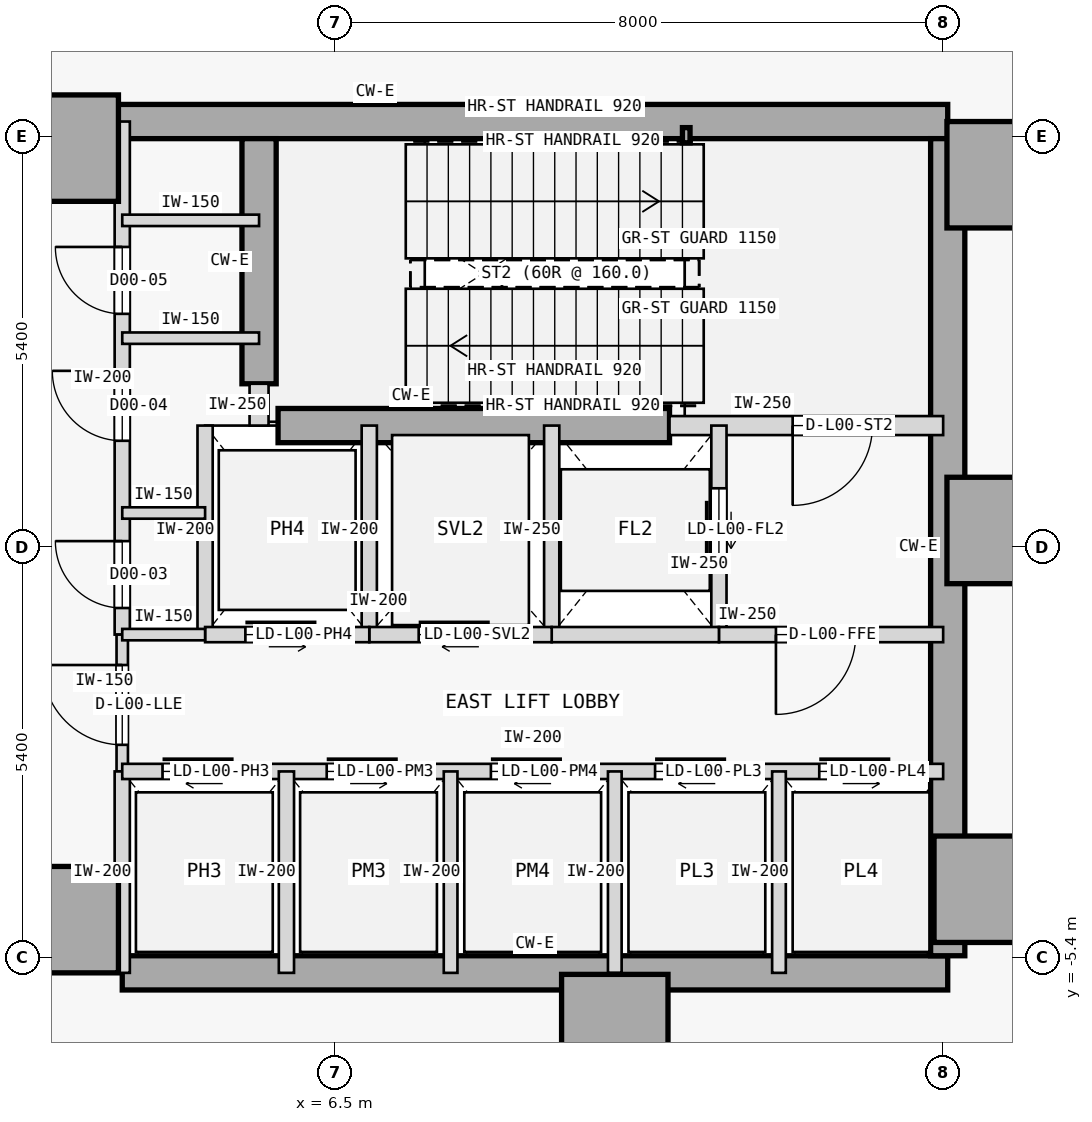
"""IFC4 building model, lengths in metres.
Left out: names, types, materials, properties, quantities, classifications, styles, units other than length and angle.
Written with IfcOpenShell. Run it as: python <this file> out.ifc"""

import sys

from ifc_helpers import new_model, si_unit, direction, frame, frame_2d, origin, origin_2d, place, context, subcontext, project, spatial, rectangle, hollow_rectangle, extrude, element, fill, save


model = new_model("IFC4")
c1 = context("Model", 3, precision=1e-05, world=origin(), true_north=direction((0.0, 1.0)))
c2 = subcontext(c1, "Body", "Model", "MODEL_VIEW")
j1 = project(units=[si_unit("LENGTHUNIT", "METRE"), si_unit("PLANEANGLEUNIT", "RADIAN")], contexts=[c1])
p1 = place(None, origin())
s1 = spatial("IfcSite", under=j1, at=p1, CompositionType="ELEMENT")
p2 = place(p1, origin())
s2 = spatial("IfcBuilding", under=s1, at=p2, CompositionType="ELEMENT")
p3 = place(p2, origin())
s3 = spatial("IfcBuildingStorey", under=s2, at=p3, CompositionType="ELEMENT", Elevation=0.0)
for number, where, z_axis, x_axis in (
    (1, (15.25, 4.9, 0.0), (0.0, 0.0, 1.0), (1.0, 0.0, 0.0)),
    (2, (15.25, 0.22, 0.0), (0.0, 0.0, 1.0), (1.0, 0.0, 0.0)),
    (3, (15.08, -4.5, 0.0), (0.0, 0.0, 1.0), (1.0, 0.0, 0.0)),
    (4, (10.18, -6.32, 0.0), (0.0, 0.0, 1.0), (1.0, 0.0, 0.0)),
    (5, (2.95, -4.9, 0.0), (0.0, 0.0, 1.0), (1.0, 0.0, 0.0)),
    (6, (2.95, 5.25, 0.0), (0.0, 0.0, 1.0), (1.0, 0.0, 0.0)),
):
    element("IfcColumn", number, at=place(p3, frame(where, z_axis=z_axis, x_axis=x_axis)), inside=s3, PredefinedType="COLUMN", context=c2, shape_type="SweptSolid", body=[
        extrude(rectangle(XDim=1.4, YDim=1.4, at=origin_2d()), origin(), (0.0, 0.0, 1.0), 9.6),
    ])
p4 = place(p3, frame((3.15, 5.6, 0.0), z_axis=(0.0, 0.0, 1.0), x_axis=(1.0, 0.0, 0.0)))
e7 = element("IfcWall", 7, at=p4, inside=s3, PredefinedType="SHEAR", context=c2, shape_type="SweptSolid", body=[
    extrude(rectangle(XDim=11.41, YDim=0.45, at=frame_2d((5.705, 0.0))), origin(), (0.0, 0.0, 1.0), 9.2),
])
p5 = place(p3, frame((3.7, -5.6, 0.0), z_axis=(0.0, 0.0, 1.0), x_axis=(1.0, 0.0, 0.0)))
e8 = element("IfcWall", 8, at=p5, inside=s3, PredefinedType="SHEAR", context=c2, shape_type="SweptSolid", body=[
    extrude(rectangle(XDim=10.86, YDim=0.45, at=frame_2d((5.43, 0.0))), origin(), (0.0, 0.0, 1.0), 9.2),
])
p6 = place(p3, frame((14.56, -5.375, 0.0), z_axis=(0.0, 0.0, 1.0), x_axis=(0.0, 1.0, 0.0)))
e9 = element("IfcWall", 9, at=p6, inside=s3, PredefinedType="SHEAR", context=c2, shape_type="SweptSolid", body=[
    extrude(rectangle(XDim=10.75, YDim=0.45, at=frame_2d((5.375, 0.0))), origin(), (0.0, 0.0, 1.0), 9.2),
])
p7 = place(p3, frame((5.5, 2.15, 0.0), z_axis=(0.0, 0.0, 1.0), x_axis=(0.0, 1.0, 0.0)))
e10 = element("IfcWall", 10, at=p7, inside=s3, PredefinedType="SHEAR", context=c2, shape_type="SweptSolid", body=[
    extrude(rectangle(XDim=3.225, YDim=0.45, at=frame_2d((1.613, 0.0))), origin(), (0.0, 0.0, 1.0), 9.2),
])
p8 = place(p3, frame((5.75, 1.6, 0.0), z_axis=(0.0, 0.0, 1.0), x_axis=(1.0, 0.0, 0.0)))
e11 = element("IfcWall", 11, at=p8, inside=s3, PredefinedType="SHEAR", context=c2, shape_type="SweptSolid", body=[
    extrude(rectangle(XDim=5.15, YDim=0.45, at=frame_2d((2.575, 0.0))), origin(), (0.0, 0.0, 1.0), 9.2),
])
p9 = place(p3, frame((11.12, 5.42, 0.0), z_axis=(0.0, 0.0, 1.0), x_axis=(1.0, 0.0, 0.0)))
e12 = element("IfcColumn", 12, at=p9, inside=s3, PredefinedType="COLUMN", context=c2, shape_type="SweptSolid", body=[
    extrude(hollow_rectangle(XDim=0.1, YDim=0.2, WallThickness=0.008, at=origin_2d()), origin(), (0.0, 0.0, 1.0), 9.6),
])
p10 = place(p3, frame((10.9, 1.6, 0.0), z_axis=(0.0, 0.0, 1.0), x_axis=(1.0, 0.0, 0.0)))
e13 = element("IfcWall", 13, at=p10, inside=s3, PredefinedType="STANDARD", context=c2, shape_type="SweptSolid", body=[
    extrude(rectangle(XDim=3.6, YDim=0.25, at=frame_2d((1.8, 0.0))), origin(), (0.0, 0.0, 1.0), 9.2),
])
p11 = place(p10, frame((1.62, 0.0, 0.0)))
e14 = element("IfcOpeningElement", 14, at=p11, cuts=e13, PredefinedType="OPENING", context=c2, shape_type="SweptSolid", body=[
    extrude(rectangle(XDim=1.05, YDim=2.15, at=frame_2d((0.525, 1.075))), frame((0.0, 0.135, 0.0), z_axis=(0.0, -1.0, 0.0), x_axis=(1.0, 0.0, 0.0)), (0.0, 0.0, 1.0), 0.27),
])
p12 = place(p3, frame((5.5, 1.6, 0.0), z_axis=(0.0, 0.0, 1.0), x_axis=(0.0, 1.0, 0.0)))
e15 = element("IfcWall", 15, at=p12, inside=s3, PredefinedType="STANDARD", context=c2, shape_type="SweptSolid", body=[
    extrude(rectangle(XDim=0.55, YDim=0.25, at=frame_2d((0.275, 0.0))), origin(), (0.0, 0.0, 1.0), 9.2),
])
p13 = place(p3, frame((3.7, -1.15, 0.0), z_axis=(0.0, 0.0, 1.0), x_axis=(0.0, 1.0, 0.0)))
e16 = element("IfcWall", 16, at=p13, inside=s3, PredefinedType="STANDARD", context=c2, shape_type="SweptSolid", body=[
    extrude(rectangle(XDim=6.75, YDim=0.2, at=frame_2d((3.375, 0.0))), origin(), (0.0, 0.0, 1.0), 9.2),
])
p14 = place(p13, frame((0.35, 0.0, 0.0)))
e17 = element("IfcOpeningElement", 17, at=p14, cuts=e16, PredefinedType="OPENING", context=c2, shape_type="SweptSolid", body=[
    extrude(rectangle(XDim=0.88, YDim=2.15, at=frame_2d((0.44, 1.075))), frame((0.0, 0.11, 0.0), z_axis=(0.0, -1.0, 0.0), x_axis=(1.0, 0.0, 0.0)), (0.0, 0.0, 1.0), 0.22),
])
p15 = place(p13, frame((2.55, 0.0, 0.0)))
e18 = element("IfcOpeningElement", 18, at=p15, cuts=e16, PredefinedType="OPENING", context=c2, shape_type="SweptSolid", body=[
    extrude(rectangle(XDim=0.92, YDim=2.15, at=frame_2d((0.46, 1.075))), frame((0.0, 0.11, 0.0), z_axis=(0.0, -1.0, 0.0), x_axis=(1.0, 0.0, 0.0)), (0.0, 0.0, 1.0), 0.22),
])
p16 = place(p13, frame((4.22, 0.0, 0.0)))
e19 = element("IfcOpeningElement", 19, at=p16, cuts=e16, PredefinedType="OPENING", context=c2, shape_type="SweptSolid", body=[
    extrude(rectangle(XDim=0.88, YDim=2.15, at=frame_2d((0.44, 1.075))), frame((0.0, 0.11, 0.0), z_axis=(0.0, -1.0, 0.0), x_axis=(1.0, 0.0, 0.0)), (0.0, 0.0, 1.0), 0.22),
])
p17 = place(p3, frame((3.7, -2.95, 0.0), z_axis=(0.0, 0.0, 1.0), x_axis=(0.0, 1.0, 0.0)))
e20 = element("IfcWall", 20, at=p17, inside=s3, PredefinedType="PARTITIONING", context=c2, shape_type="SweptSolid", body=[
    extrude(rectangle(XDim=1.8, YDim=0.15, at=frame_2d((0.9, 0.0))), origin(), (0.0, 0.0, 1.0), 9.2),
])
p18 = place(p17, frame((0.35, 0.0, 0.0)))
e21 = element("IfcOpeningElement", 21, at=p18, cuts=e20, PredefinedType="OPENING", context=c2, shape_type="SweptSolid", body=[
    extrude(rectangle(XDim=1.05, YDim=2.18, at=frame_2d((0.525, 1.09))), frame((0.0, 0.085, 0.0), z_axis=(0.0, -1.0, 0.0), x_axis=(1.0, 0.0, 0.0)), (0.0, 0.0, 1.0), 0.17),
])
p19 = place(p3, frame((3.7, -5.6, 0.0), z_axis=(0.0, 0.0, 1.0), x_axis=(0.0, 1.0, 0.0)))
e22 = element("IfcWall", 22, at=p19, inside=s3, PredefinedType="STANDARD", context=c2, shape_type="SweptSolid", body=[
    extrude(rectangle(XDim=2.65, YDim=0.2, at=frame_2d((1.325, 0.0))), origin(), (0.0, 0.0, 1.0), 9.2),
])
p20 = place(p3, frame((11.55, -1.15, 0.0), z_axis=(0.0, 0.0, 1.0), x_axis=(0.0, 1.0, 0.0)))
e23 = element("IfcWall", 23, at=p20, inside=s3, PredefinedType="STANDARD", context=c2, shape_type="SweptSolid", body=[
    extrude(rectangle(XDim=2.75, YDim=0.2, at=frame_2d((1.375, 0.0))), origin(), (0.0, 0.0, 1.0), 9.2),
])
p21 = place(p20, frame((0.825, 0.0, 0.0)))
e24 = element("IfcOpeningElement", 24, at=p21, cuts=e23, PredefinedType="OPENING", context=c2, shape_type="SweptSolid", body=[
    extrude(rectangle(XDim=1.1, YDim=2.15, at=frame_2d((0.55, 1.075))), frame((0.0, 0.11, 0.0), z_axis=(0.0, -1.0, 0.0), x_axis=(1.0, 0.0, 0.0)), (0.0, 0.0, 1.0), 0.22),
])
p22 = place(p3, frame((9.35, -1.15, 0.0), z_axis=(0.0, 0.0, 1.0), x_axis=(0.0, 1.0, 0.0)))
e25 = element("IfcWall", 25, at=p22, inside=s3, PredefinedType="STANDARD", context=c2, shape_type="SweptSolid", body=[
    extrude(rectangle(XDim=2.75, YDim=0.2, at=frame_2d((1.375, 0.0))), origin(), (0.0, 0.0, 1.0), 9.2),
])
p23 = place(p3, frame((11.55, -1.15, 0.0), z_axis=(0.0, 0.0, 1.0), x_axis=(1.0, 0.0, 0.0)))
e26 = element("IfcWall", 26, at=p23, inside=s3, PredefinedType="STANDARD", context=c2, shape_type="SweptSolid", body=[
    extrude(rectangle(XDim=2.95, YDim=0.2, at=frame_2d((1.475, 0.0))), origin(), (0.0, 0.0, 1.0), 9.2),
])
p24 = place(p23, frame((0.75, 0.0, 0.0)))
e27 = element("IfcOpeningElement", 27, at=p24, cuts=e26, PredefinedType="OPENING", context=c2, shape_type="SweptSolid", body=[
    extrude(rectangle(XDim=1.05, YDim=2.18, at=frame_2d((0.525, 1.09))), frame((0.0, 0.11, 0.0), z_axis=(0.0, -1.0, 0.0), x_axis=(1.0, 0.0, 0.0)), (0.0, 0.0, 1.0), 0.22),
])
p25 = place(p3, frame((9.35, -1.15, 0.0), z_axis=(0.0, 0.0, 1.0), x_axis=(1.0, 0.0, 0.0)))
e28 = element("IfcWall", 28, at=p25, inside=s3, PredefinedType="STANDARD", context=c2, shape_type="SweptSolid", body=[
    extrude(rectangle(XDim=2.2, YDim=0.2, at=frame_2d((1.1, 0.0))), origin(), (0.0, 0.0, 1.0), 9.2),
])
p26 = place(p3, frame((6.95, -1.15, 0.0), z_axis=(0.0, 0.0, 1.0), x_axis=(0.0, 1.0, 0.0)))
e29 = element("IfcWall", 29, at=p26, inside=s3, PredefinedType="STANDARD", context=c2, shape_type="SweptSolid", body=[
    extrude(rectangle(XDim=2.75, YDim=0.2, at=frame_2d((1.375, 0.0))), origin(), (0.0, 0.0, 1.0), 9.2),
])
p27 = place(p3, frame((6.95, -1.15, 0.0), z_axis=(0.0, 0.0, 1.0), x_axis=(1.0, 0.0, 0.0)))
e30 = element("IfcWall", 30, at=p27, inside=s3, PredefinedType="STANDARD", context=c2, shape_type="SweptSolid", body=[
    extrude(rectangle(XDim=2.4, YDim=0.2, at=frame_2d((1.2, 0.0))), origin(), (0.0, 0.0, 1.0), 9.2),
])
p28 = place(p27, frame((0.65, 0.0, 0.0)))
e31 = element("IfcOpeningElement", 31, at=p28, cuts=e30, PredefinedType="OPENING", context=c2, shape_type="SweptSolid", body=[
    extrude(rectangle(XDim=1.1, YDim=2.15, at=frame_2d((0.55, 1.075))), frame((0.0, 0.11, 0.0), z_axis=(0.0, -1.0, 0.0), x_axis=(1.0, 0.0, 0.0)), (0.0, 0.0, 1.0), 0.22),
])
p29 = place(p3, frame((4.79, -1.15, 0.0), z_axis=(0.0, 0.0, 1.0), x_axis=(0.0, 1.0, 0.0)))
e32 = element("IfcWall", 32, at=p29, inside=s3, PredefinedType="STANDARD", context=c2, shape_type="SweptSolid", body=[
    extrude(rectangle(XDim=2.75, YDim=0.2, at=frame_2d((1.375, 0.0))), origin(), (0.0, 0.0, 1.0), 9.2),
])
p30 = place(p3, frame((4.79, -1.15, 0.0), z_axis=(0.0, 0.0, 1.0), x_axis=(1.0, 0.0, 0.0)))
e33 = element("IfcWall", 33, at=p30, inside=s3, PredefinedType="STANDARD", context=c2, shape_type="SweptSolid", body=[
    extrude(rectangle(XDim=2.16, YDim=0.2, at=frame_2d((1.08, 0.0))), origin(), (0.0, 0.0, 1.0), 9.2),
])
p31 = place(p30, frame((0.53, 0.0, 0.0)))
e34 = element("IfcOpeningElement", 34, at=p31, cuts=e33, PredefinedType="OPENING", context=c2, shape_type="SweptSolid", body=[
    extrude(rectangle(XDim=1.1, YDim=2.15, at=frame_2d((0.55, 1.075))), frame((0.0, 0.11, 0.0), z_axis=(0.0, -1.0, 0.0), x_axis=(1.0, 0.0, 0.0)), (0.0, 0.0, 1.0), 0.22),
])
p32 = place(p3, frame((3.7, -1.15, 0.0), z_axis=(0.0, 0.0, 1.0), x_axis=(1.0, 0.0, 0.0)))
e35 = element("IfcWall", 35, at=p32, inside=s3, PredefinedType="PARTITIONING", context=c2, shape_type="SweptSolid", body=[
    extrude(rectangle(XDim=1.09, YDim=0.15, at=frame_2d((0.545, 0.0))), origin(), (0.0, 0.0, 1.0), 9.2),
])
p33 = place(p3, frame((3.7, -2.95, 0.0), z_axis=(0.0, 0.0, 1.0), x_axis=(1.0, 0.0, 0.0)))
e36 = element("IfcWall", 36, at=p33, inside=s3, PredefinedType="STANDARD", context=c2, shape_type="SweptSolid", body=[
    extrude(rectangle(XDim=10.8, YDim=0.2, at=frame_2d((5.4, 0.0))), origin(), (0.0, 0.0, 1.0), 9.2),
])
p34 = place(p33, frame((0.53, 0.0, 0.0)))
e37 = element("IfcOpeningElement", 37, at=p34, cuts=e36, PredefinedType="OPENING", context=c2, shape_type="SweptSolid", body=[
    extrude(rectangle(XDim=1.1, YDim=2.15, at=frame_2d((0.55, 1.075))), frame((0.0, 0.11, 0.0), z_axis=(0.0, -1.0, 0.0), x_axis=(1.0, 0.0, 0.0)), (0.0, 0.0, 1.0), 0.22),
])
p35 = place(p33, frame((2.69, 0.0, 0.0)))
e38 = element("IfcOpeningElement", 38, at=p35, cuts=e36, PredefinedType="OPENING", context=c2, shape_type="SweptSolid", body=[
    extrude(rectangle(XDim=1.1, YDim=2.15, at=frame_2d((0.55, 1.075))), frame((0.0, 0.11, 0.0), z_axis=(0.0, -1.0, 0.0), x_axis=(1.0, 0.0, 0.0)), (0.0, 0.0, 1.0), 0.22),
])
p36 = place(p33, frame((4.85, 0.0, 0.0)))
e39 = element("IfcOpeningElement", 39, at=p36, cuts=e36, PredefinedType="OPENING", context=c2, shape_type="SweptSolid", body=[
    extrude(rectangle(XDim=1.1, YDim=2.15, at=frame_2d((0.55, 1.075))), frame((0.0, 0.11, 0.0), z_axis=(0.0, -1.0, 0.0), x_axis=(1.0, 0.0, 0.0)), (0.0, 0.0, 1.0), 0.22),
])
p37 = place(p33, frame((7.01, 0.0, 0.0)))
e40 = element("IfcOpeningElement", 40, at=p37, cuts=e36, PredefinedType="OPENING", context=c2, shape_type="SweptSolid", body=[
    extrude(rectangle(XDim=1.1, YDim=2.15, at=frame_2d((0.55, 1.075))), frame((0.0, 0.11, 0.0), z_axis=(0.0, -1.0, 0.0), x_axis=(1.0, 0.0, 0.0)), (0.0, 0.0, 1.0), 0.22),
])
p38 = place(p33, frame((9.17, 0.0, 0.0)))
e41 = element("IfcOpeningElement", 41, at=p38, cuts=e36, PredefinedType="OPENING", context=c2, shape_type="SweptSolid", body=[
    extrude(rectangle(XDim=1.1, YDim=2.15, at=frame_2d((0.55, 1.075))), frame((0.0, 0.11, 0.0), z_axis=(0.0, -1.0, 0.0), x_axis=(1.0, 0.0, 0.0)), (0.0, 0.0, 1.0), 0.22),
])
p39 = place(p3, frame((5.86, -5.6, 0.0), z_axis=(0.0, 0.0, 1.0), x_axis=(0.0, 1.0, 0.0)))
e42 = element("IfcWall", 42, at=p39, inside=s3, PredefinedType="STANDARD", context=c2, shape_type="SweptSolid", body=[
    extrude(rectangle(XDim=2.65, YDim=0.2, at=frame_2d((1.325, 0.0))), origin(), (0.0, 0.0, 1.0), 9.2),
])
for number, where, z_axis, x_axis in (
    (43, (12.34, -5.6, 0.0), (0.0, 0.0, 1.0), (0.0, 1.0, 0.0)),
    (44, (10.18, -5.6, 0.0), (0.0, 0.0, 1.0), (0.0, 1.0, 0.0)),
    (45, (8.02, -5.6, 0.0), (0.0, 0.0, 1.0), (0.0, 1.0, 0.0)),
):
    element("IfcWall", number, at=place(p3, frame(where, z_axis=z_axis, x_axis=x_axis)), inside=s3, PredefinedType="STANDARD", context=c2, shape_type="SweptSolid", body=[
        extrude(rectangle(XDim=2.65, YDim=0.18, at=frame_2d((1.325, 0.0))), origin(), (0.0, 0.0, 1.0), 9.2),
    ])
p40 = place(p3, frame((3.7, 4.3, 0.0), z_axis=(0.0, 0.0, 1.0), x_axis=(1.0, 0.0, 0.0)))
e46 = element("IfcWall", 46, at=p40, inside=s3, PredefinedType="PARTITIONING", context=c2, shape_type="SweptSolid", body=[
    extrude(rectangle(XDim=1.8, YDim=0.15, at=frame_2d((0.9, 0.0))), origin(), (0.0, 0.0, 1.0), 9.2),
])
p41 = place(p3, frame((3.7, 0.45, 0.0), z_axis=(0.0, 0.0, 1.0), x_axis=(1.0, 0.0, 0.0)))
e47 = element("IfcWall", 47, at=p41, inside=s3, PredefinedType="PARTITIONING", context=c2, shape_type="SweptSolid", body=[
    extrude(rectangle(XDim=1.09, YDim=0.15, at=frame_2d((0.545, 0.0))), origin(), (0.0, 0.0, 1.0), 9.2),
])
p42 = place(p3, frame((3.7, 2.75, 0.0), z_axis=(0.0, 0.0, 1.0), x_axis=(1.0, 0.0, 0.0)))
e48 = element("IfcWall", 48, at=p42, inside=s3, PredefinedType="PARTITIONING", context=c2, shape_type="SweptSolid", body=[
    extrude(rectangle(XDim=1.8, YDim=0.15, at=frame_2d((0.9, 0.0))), origin(), (0.0, 0.0, 1.0), 9.2),
])
p43 = place(p11, frame((1.05, 0.0, 0.0), z_axis=(0.0, 0.0, 1.0), x_axis=(-1.0, 0.0, 0.0)))
e49 = element("IfcDoor", 49, at=p43, inside=s3, OperationType="SINGLE_SWING_LEFT", PredefinedType="DOOR", context=c2, shape_type="SweptSolid", body=[
    extrude(rectangle(XDim=1.05, YDim=2.15, at=frame_2d((0.525, 1.075))), frame((0.0, 0.025, 0.0), z_axis=(0.0, -1.0, 0.0), x_axis=(1.0, 0.0, 0.0)), (0.0, 0.0, 1.0), 0.05),
])
fill(e14, e49)
p44 = place(p24, frame((1.05, 0.0, 0.0), z_axis=(0.0, 0.0, 1.0), x_axis=(-1.0, 0.0, 0.0)))
e50 = element("IfcDoor", 50, at=p44, inside=s3, OperationType="SINGLE_SWING_LEFT", PredefinedType="DOOR", context=c2, shape_type="SweptSolid", body=[
    extrude(rectangle(XDim=1.05, YDim=2.18, at=frame_2d((0.525, 1.09))), frame((0.0, 0.025, 0.0), z_axis=(0.0, -1.0, 0.0), x_axis=(1.0, 0.0, 0.0)), (0.0, 0.0, 1.0), 0.05),
])
fill(e27, e50)
p45 = place(p18, origin())
e51 = element("IfcDoor", 51, at=p45, inside=s3, OperationType="SINGLE_SWING_RIGHT", PredefinedType="DOOR", context=c2, shape_type="SweptSolid", body=[
    extrude(rectangle(XDim=1.05, YDim=2.18, at=frame_2d((0.525, 1.09))), frame((0.0, 0.025, 0.0), z_axis=(0.0, -1.0, 0.0), x_axis=(1.0, 0.0, 0.0)), (0.0, 0.0, 1.0), 0.05),
])
fill(e21, e51)
p46 = place(p21, origin())
e52 = element("IfcDoor", 52, at=p46, inside=s3, OperationType="SLIDING_TO_RIGHT", PredefinedType="DOOR", context=c2, shape_type="SweptSolid", body=[
    extrude(rectangle(XDim=1.1, YDim=2.15, at=frame_2d((0.55, 1.075))), frame((0.0, 0.025, 0.0), z_axis=(0.0, -1.0, 0.0), x_axis=(1.0, 0.0, 0.0)), (0.0, 0.0, 1.0), 0.05),
])
fill(e24, e52)
p47 = place(p28, origin())
e53 = element("IfcDoor", 53, at=p47, inside=s3, OperationType="SLIDING_TO_RIGHT", PredefinedType="DOOR", context=c2, shape_type="SweptSolid", body=[
    extrude(rectangle(XDim=1.1, YDim=2.15, at=frame_2d((0.55, 1.075))), frame((0.0, 0.025, 0.0), z_axis=(0.0, -1.0, 0.0), x_axis=(1.0, 0.0, 0.0)), (0.0, 0.0, 1.0), 0.05),
])
fill(e31, e53)
p48 = place(p31, origin())
e54 = element("IfcDoor", 54, at=p48, inside=s3, OperationType="SLIDING_TO_LEFT", PredefinedType="DOOR", context=c2, shape_type="SweptSolid", body=[
    extrude(rectangle(XDim=1.1, YDim=2.15, at=frame_2d((0.55, 1.075))), frame((0.0, 0.025, 0.0), z_axis=(0.0, -1.0, 0.0), x_axis=(1.0, 0.0, 0.0)), (0.0, 0.0, 1.0), 0.05),
])
fill(e34, e54)
p49 = place(p34, origin())
e55 = element("IfcDoor", 55, at=p49, inside=s3, OperationType="SLIDING_TO_RIGHT", PredefinedType="DOOR", context=c2, shape_type="SweptSolid", body=[
    extrude(rectangle(XDim=1.1, YDim=2.15, at=frame_2d((0.55, 1.075))), frame((0.0, 0.025, 0.0), z_axis=(0.0, -1.0, 0.0), x_axis=(1.0, 0.0, 0.0)), (0.0, 0.0, 1.0), 0.05),
])
fill(e37, e55)
p50 = place(p35, origin())
e56 = element("IfcDoor", 56, at=p50, inside=s3, OperationType="SLIDING_TO_LEFT", PredefinedType="DOOR", context=c2, shape_type="SweptSolid", body=[
    extrude(rectangle(XDim=1.1, YDim=2.15, at=frame_2d((0.55, 1.075))), frame((0.0, 0.025, 0.0), z_axis=(0.0, -1.0, 0.0), x_axis=(1.0, 0.0, 0.0)), (0.0, 0.0, 1.0), 0.05),
])
fill(e38, e56)
p51 = place(p36, origin())
e57 = element("IfcDoor", 57, at=p51, inside=s3, OperationType="SLIDING_TO_RIGHT", PredefinedType="DOOR", context=c2, shape_type="SweptSolid", body=[
    extrude(rectangle(XDim=1.1, YDim=2.15, at=frame_2d((0.55, 1.075))), frame((0.0, 0.025, 0.0), z_axis=(0.0, -1.0, 0.0), x_axis=(1.0, 0.0, 0.0)), (0.0, 0.0, 1.0), 0.05),
])
fill(e39, e57)
p52 = place(p37, origin())
e58 = element("IfcDoor", 58, at=p52, inside=s3, OperationType="SLIDING_TO_RIGHT", PredefinedType="DOOR", context=c2, shape_type="SweptSolid", body=[
    extrude(rectangle(XDim=1.1, YDim=2.15, at=frame_2d((0.55, 1.075))), frame((0.0, 0.025, 0.0), z_axis=(0.0, -1.0, 0.0), x_axis=(1.0, 0.0, 0.0)), (0.0, 0.0, 1.0), 0.05),
])
fill(e40, e58)
p53 = place(p38, origin())
e59 = element("IfcDoor", 59, at=p53, inside=s3, OperationType="SLIDING_TO_LEFT", PredefinedType="DOOR", context=c2, shape_type="SweptSolid", body=[
    extrude(rectangle(XDim=1.1, YDim=2.15, at=frame_2d((0.55, 1.075))), frame((0.0, 0.025, 0.0), z_axis=(0.0, -1.0, 0.0), x_axis=(1.0, 0.0, 0.0)), (0.0, 0.0, 1.0), 0.05),
])
fill(e41, e59)
p54 = place(p14, origin())
e60 = element("IfcDoor", 60, at=p54, inside=s3, OperationType="SINGLE_SWING_RIGHT", PredefinedType="DOOR", context=c2, shape_type="SweptSolid", body=[
    extrude(rectangle(XDim=0.88, YDim=2.15, at=frame_2d((0.44, 1.075))), frame((0.0, 0.025, 0.0), z_axis=(0.0, -1.0, 0.0), x_axis=(1.0, 0.0, 0.0)), (0.0, 0.0, 1.0), 0.05),
])
fill(e17, e60)
p55 = place(p15, origin())
e61 = element("IfcDoor", 61, at=p55, inside=s3, OperationType="SINGLE_SWING_RIGHT", PredefinedType="DOOR", context=c2, shape_type="SweptSolid", body=[
    extrude(rectangle(XDim=0.92, YDim=2.15, at=frame_2d((0.46, 1.075))), frame((0.0, 0.025, 0.0), z_axis=(0.0, -1.0, 0.0), x_axis=(1.0, 0.0, 0.0)), (0.0, 0.0, 1.0), 0.05),
])
fill(e18, e61)
p56 = place(p16, origin())
e62 = element("IfcDoor", 62, at=p56, inside=s3, OperationType="SINGLE_SWING_RIGHT", PredefinedType="DOOR", context=c2, shape_type="SweptSolid", body=[
    extrude(rectangle(XDim=0.88, YDim=2.15, at=frame_2d((0.44, 1.075))), frame((0.0, 0.025, 0.0), z_axis=(0.0, -1.0, 0.0), x_axis=(1.0, 0.0, 0.0)), (0.0, 0.0, 1.0), 0.05),
])
fill(e19, e62)
save(model, sys.argv[1])
